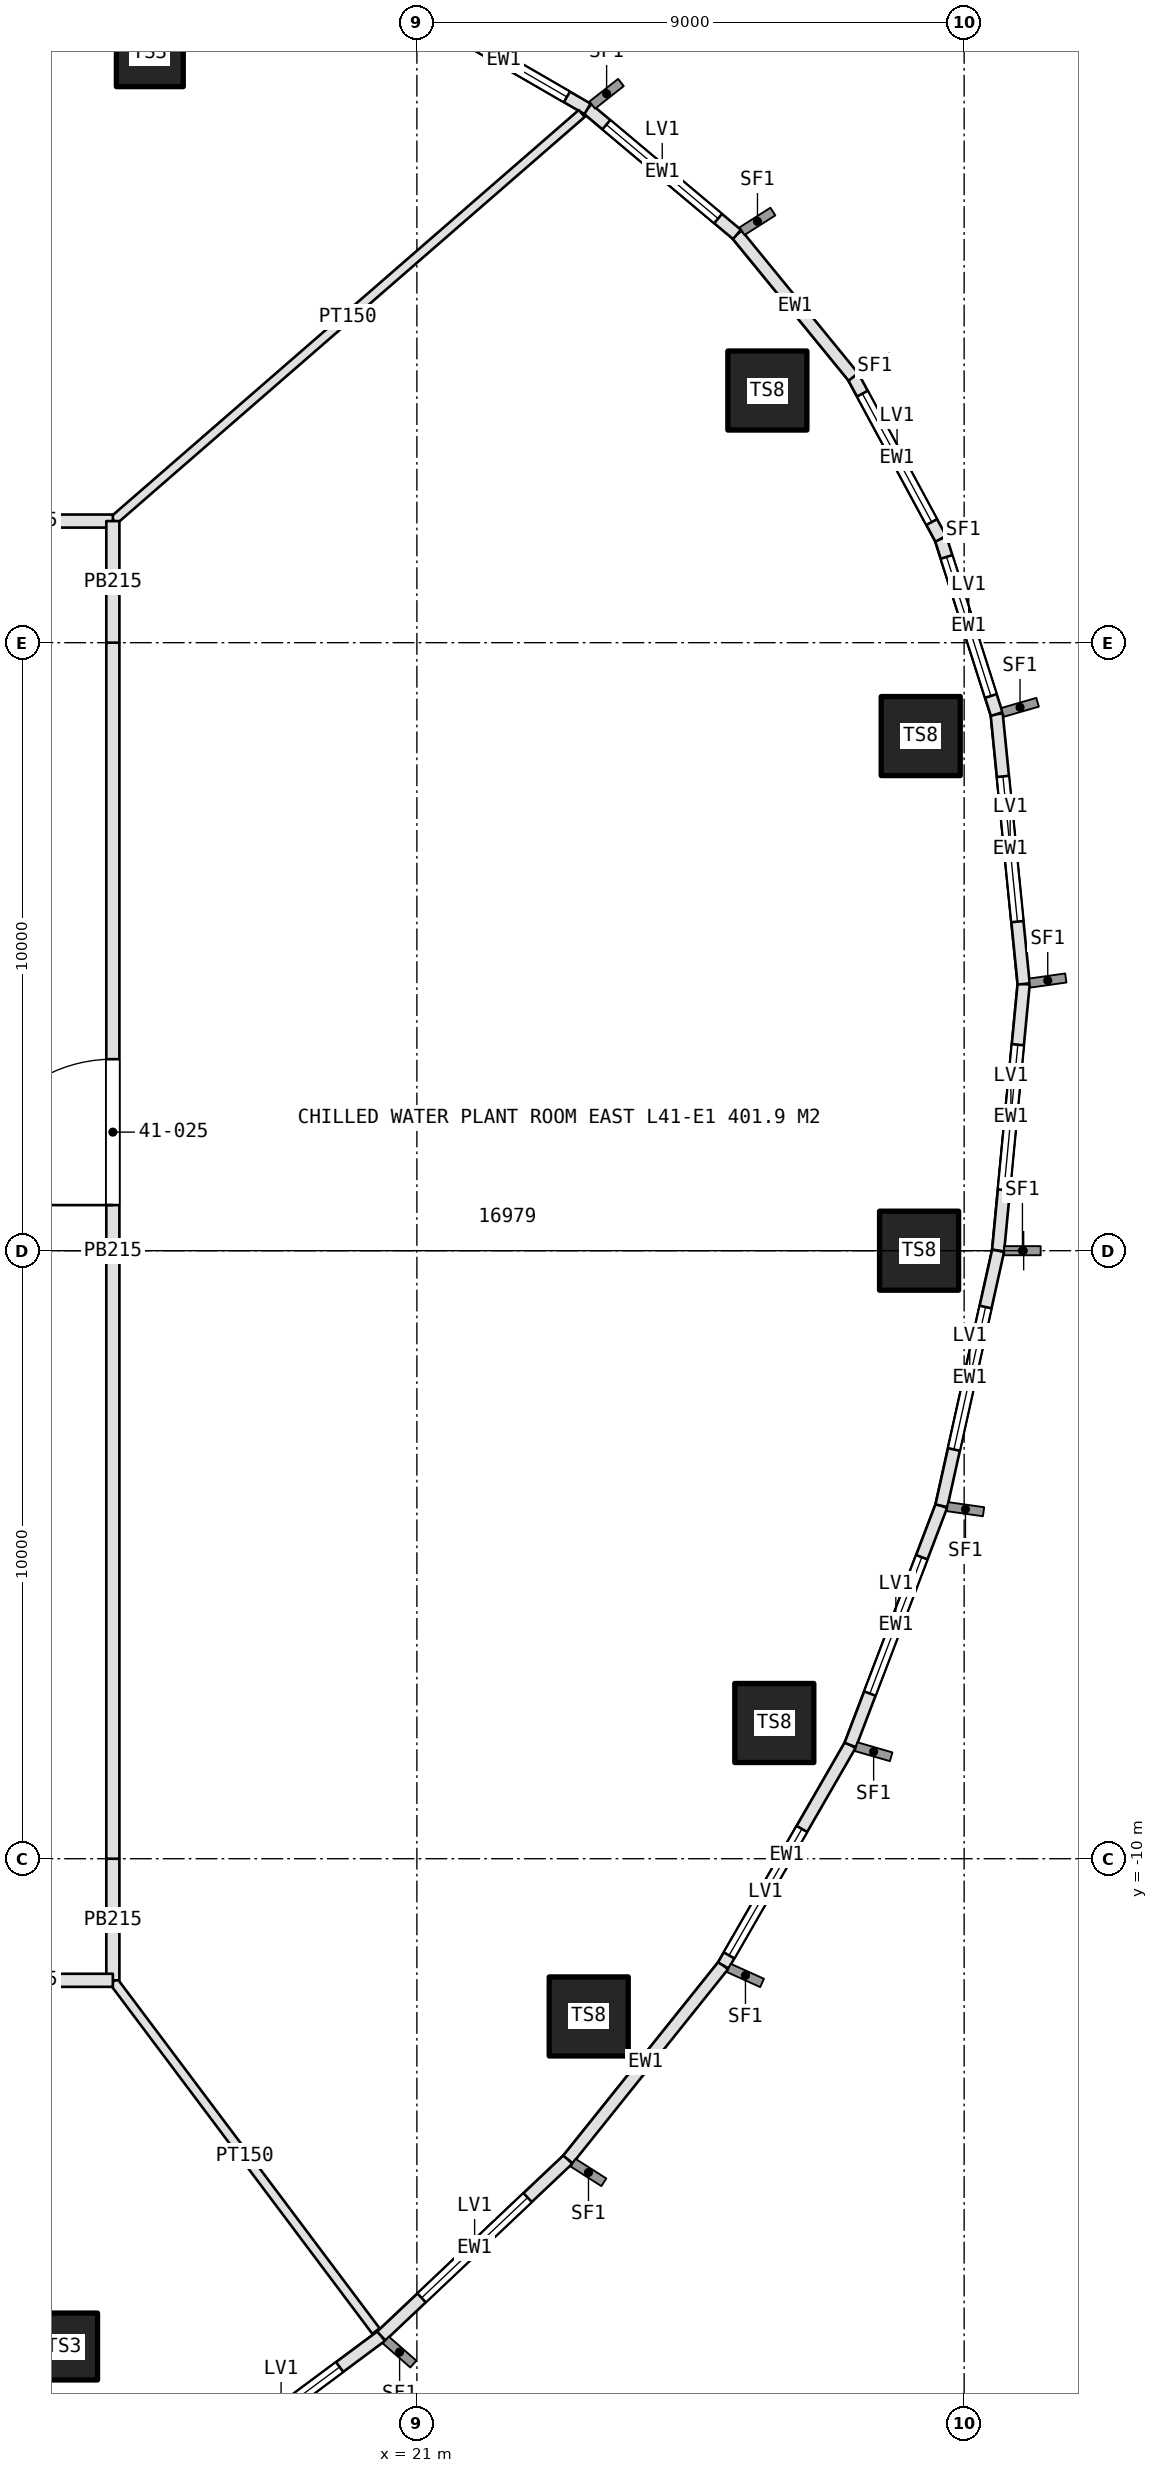
"""IFC4 building model, lengths in metres.
Left out: names, types, materials, properties, quantities, classifications, styles, units other than length and angle.
Written with IfcOpenShell. Run it as: python <this file> out.ifc"""

import sys

from ifc_helpers import new_model, si_unit, direction, frame, frame_2d, origin, origin_2d, place, context, subcontext, project, spatial, rectangle, hollow_rectangle, extrude, element, fill, save


model = new_model("IFC4")
c1 = context("Model", 3, precision=1e-05, world=origin(), true_north=direction((0.0, 1.0)))
c2 = subcontext(c1, "Body", "Model", "MODEL_VIEW")
j1 = project(units=[si_unit("LENGTHUNIT", "METRE"), si_unit("PLANEANGLEUNIT", "RADIAN")], contexts=[c1])
p1 = place(None, origin())
s1 = spatial("IfcSite", under=j1, at=p1, CompositionType="ELEMENT")
p2 = place(p1, origin())
s2 = spatial("IfcBuilding", under=s1, at=p2, CompositionType="ELEMENT")
p3 = place(p2, frame((0.0, 0.0, 189.8)))
s3 = spatial("IfcBuildingStorey", under=s2, at=p3, CompositionType="ELEMENT", Elevation=189.8)
p4 = place(p3, frame((29.259, 0.0, 0.775), z_axis=(-0.767771389369, 0.0, 0.640723882547), x_axis=(0.0, -1.0, 0.0)))
e1 = element("IfcColumn", 1, at=p4, inside=s3, PredefinedType="COLUMN", context=c2, shape_type="SweptSolid", body=[
    extrude(hollow_rectangle(XDim=1.3, YDim=1.3, WallThickness=0.15, at=origin_2d()), origin(), (0.0, 0.0, 1.0), 5.385),
])
p5 = place(p3, frame((29.286, 8.464, 0.775), z_axis=(-0.732679942775, -0.211697678224, 0.64681078724), x_axis=(0.277581506232, -0.960702090868, 0.0)))
e2 = element("IfcColumn", 2, at=p5, inside=s3, PredefinedType="COLUMN", context=c2, shape_type="SweptSolid", body=[
    extrude(hollow_rectangle(XDim=1.3, YDim=1.3, WallThickness=0.15, at=origin_2d()), origin(), (0.0, 0.0, 1.0), 5.334),
])
p6 = place(p3, frame((26.764, 14.147, 0.775), z_axis=(-0.610454698287, -0.322859749878, 0.723261116919), x_axis=(0.467523310698, -0.883980742977, 0.0)))
e3 = element("IfcColumn", 3, at=p6, inside=s3, PredefinedType="COLUMN", context=c2, shape_type="SweptSolid", body=[
    extrude(hollow_rectangle(XDim=1.3, YDim=1.3, WallThickness=0.15, at=origin_2d()), origin(), (0.0, 0.0, 1.0), 4.77),
])
for number, where, z_axis, x_axis in (
    (4, (16.608, 19.695, 0.0), (0.0, 0.0, 1.0), (1.0, 0.0, 0.0)),
    (5, (15.198, -18.023, 0.0), (0.0, 0.0, 1.0), (1.0, 0.0, 0.0)),
):
    element("IfcColumn", number, at=place(p3, frame(where, z_axis=z_axis, x_axis=x_axis)), inside=s3, PredefinedType="COLUMN", context=c2, shape_type="SweptSolid", body=[
        extrude(hollow_rectangle(XDim=1.1, YDim=1.1, WallThickness=0.08, at=origin_2d()), origin(), (0.0, 0.0, 1.0), 5.0),
    ])
p7 = place(p3, frame((23.826, -12.594, 0.775), z_axis=(-0.603464431444, 0.319030943318, 0.730787203765), x_axis=(-0.46737246298, -0.884060507459, 0.0)))
e6 = element("IfcColumn", 6, at=p7, inside=s3, PredefinedType="COLUMN", context=c2, shape_type="SweptSolid", body=[
    extrude(hollow_rectangle(XDim=1.3, YDim=1.3, WallThickness=0.15, at=origin_2d()), origin(), (0.0, 0.0, 1.0), 4.721),
])
p8 = place(p3, frame((26.878, -7.768, 0.775), z_axis=(-0.766908744303, 0.22155236219, 0.602300198174), x_axis=(-0.277540747952, -0.960713866469, 0.0)))
e7 = element("IfcColumn", 7, at=p8, inside=s3, PredefinedType="COLUMN", context=c2, shape_type="SweptSolid", body=[
    extrude(hollow_rectangle(XDim=1.3, YDim=1.3, WallThickness=0.15, at=origin_2d()), origin(), (0.0, 0.0, 1.0), 5.728),
])
p9 = place(p3, frame((30.559, 0.0, 0.0), z_axis=(0.0, 0.0, 1.0), x_axis=(0.095339778548, 0.995444788337, 0.0)))
e8 = element("IfcWall", 8, at=p9, inside=s3, PredefinedType="SOLIDWALL", context=c2, shape_type="SweptSolid", body=[
    extrude(rectangle(XDim=4.407, YDim=0.2, at=frame_2d((2.204, 0.0))), origin(), (0.0, 0.0, 1.0), 5.0),
])
p10 = place(p9, frame((1.003, 0.0, 1.6)))
e9 = element("IfcOpeningElement", 9, at=p10, cuts=e8, PredefinedType="OPENING", context=c2, shape_type="SweptSolid", body=[
    extrude(rectangle(XDim=2.4, YDim=1.8, at=frame_2d((1.2, 0.9))), frame((0.0, 0.11, 0.0), z_axis=(0.0, -1.0, 0.0), x_axis=(1.0, 0.0, 0.0)), (0.0, 0.0, 1.0), 0.22),
])
p11 = place(p3, frame((30.979, 4.387, 0.0), z_axis=(0.0, 0.0, 1.0), x_axis=(-0.099509138376, 0.99503664826, 0.0)))
e10 = element("IfcWall", 10, at=p11, inside=s3, PredefinedType="SOLIDWALL", context=c2, shape_type="SweptSolid", body=[
    extrude(rectangle(XDim=4.46, YDim=0.2, at=frame_2d((2.23, 0.0))), origin(), (0.0, 0.0, 1.0), 5.0),
])
p12 = place(p11, frame((1.03, 0.0, 1.6)))
e11 = element("IfcOpeningElement", 11, at=p12, cuts=e10, PredefinedType="OPENING", context=c2, shape_type="SweptSolid", body=[
    extrude(rectangle(XDim=2.4, YDim=1.8, at=frame_2d((1.2, 0.9))), frame((0.0, 0.11, 0.0), z_axis=(0.0, -1.0, 0.0), x_axis=(1.0, 0.0, 0.0)), (0.0, 0.0, 1.0), 0.22),
])
p13 = place(p3, frame((30.535, 8.825, 0.0), z_axis=(0.0, 0.0, 1.0), x_axis=(-0.303736389134, 0.952756110406, 0.0)))
e12 = element("IfcWall", 12, at=p13, inside=s3, PredefinedType="SOLIDWALL", context=c2, shape_type="SweptSolid", body=[
    extrude(rectangle(XDim=3.026, YDim=0.2, at=frame_2d((1.513, 0.0))), origin(), (0.0, 0.0, 1.0), 5.0),
])
p14 = place(p13, frame((0.313, 0.0, 1.6)))
e13 = element("IfcOpeningElement", 13, at=p14, cuts=e12, PredefinedType="OPENING", context=c2, shape_type="SweptSolid", body=[
    extrude(rectangle(XDim=2.4, YDim=1.8, at=frame_2d((1.2, 0.9))), frame((0.0, 0.11, 0.0), z_axis=(0.0, -1.0, 0.0), x_axis=(1.0, 0.0, 0.0)), (0.0, 0.0, 1.0), 0.22),
])
p15 = place(p3, frame((29.616, 11.708, 0.0), z_axis=(0.0, 0.0, 1.0), x_axis=(-0.475196386684, 0.879879761151, 0.0)))
e14 = element("IfcWall", 14, at=p15, inside=s3, PredefinedType="SOLIDWALL", context=c2, shape_type="SweptSolid", body=[
    extrude(rectangle(XDim=3.026, YDim=0.2, at=frame_2d((1.513, 0.0))), origin(), (0.0, 0.0, 1.0), 5.0),
])
p16 = place(p15, frame((0.313, 0.0, 1.6)))
e15 = element("IfcOpeningElement", 15, at=p16, cuts=e14, PredefinedType="OPENING", context=c2, shape_type="SweptSolid", body=[
    extrude(rectangle(XDim=2.4, YDim=1.8, at=frame_2d((1.2, 0.9))), frame((0.0, 0.11, 0.0), z_axis=(0.0, -1.0, 0.0), x_axis=(1.0, 0.0, 0.0)), (0.0, 0.0, 1.0), 0.22),
])
p17 = place(p3, frame((28.178, 14.371, 0.0), z_axis=(0.0, 0.0, 1.0), x_axis=(-0.632574099332, 0.774499844322, 0.0)))
e16 = element("IfcWall", 16, at=p17, inside=s3, PredefinedType="SOLIDWALL", context=c2, shape_type="SweptSolid", body=[
    extrude(rectangle(XDim=3.026, YDim=0.2, at=frame_2d((1.513, 0.0))), origin(), (0.0, 0.0, 1.0), 5.0),
])
p18 = place(p3, frame((26.264, 16.715, 0.0), z_axis=(0.0, 0.0, 1.0), x_axis=(-0.76560297856, 0.643313360051, 0.0)))
e17 = element("IfcWall", 17, at=p18, inside=s3, PredefinedType="SOLIDWALL", context=c2, shape_type="SweptSolid", body=[
    extrude(rectangle(XDim=3.21, YDim=0.2, at=frame_2d((1.605, 0.0))), origin(), (0.0, 0.0, 1.0), 5.0),
])
p19 = place(p18, frame((0.405, 0.0, 1.6)))
e18 = element("IfcOpeningElement", 18, at=p19, cuts=e17, PredefinedType="OPENING", context=c2, shape_type="SweptSolid", body=[
    extrude(rectangle(XDim=2.4, YDim=1.8, at=frame_2d((1.2, 0.9))), frame((0.0, 0.11, 0.0), z_axis=(0.0, -1.0, 0.0), x_axis=(1.0, 0.0, 0.0)), (0.0, 0.0, 1.0), 0.22),
])
p20 = place(p3, frame((23.806, 18.78, 0.0), z_axis=(0.0, 0.0, 1.0), x_axis=(-0.865315990088, 0.501226732426, 0.0)))
e19 = element("IfcWall", 19, at=p20, inside=s3, PredefinedType="SOLIDWALL", context=c2, shape_type="SweptSolid", body=[
    extrude(rectangle(XDim=3.183, YDim=0.2, at=frame_2d((1.592, 0.0))), origin(), (0.0, 0.0, 1.0), 5.0),
])
p21 = place(p20, frame((0.392, 0.0, 1.6)))
e20 = element("IfcOpeningElement", 20, at=p21, cuts=e19, PredefinedType="OPENING", context=c2, shape_type="SweptSolid", body=[
    extrude(rectangle(XDim=2.4, YDim=1.8, at=frame_2d((1.2, 0.9))), frame((0.0, 0.11, 0.0), z_axis=(0.0, -1.0, 0.0), x_axis=(1.0, 0.0, 0.0)), (0.0, 0.0, 1.0), 0.22),
])
p22 = place(p3, frame((17.119, -20.301, 0.0), z_axis=(0.0, 0.0, 1.0), x_axis=(0.802511242032, 0.596636997187, 0.0)))
e21 = element("IfcWall", 21, at=p22, inside=s3, PredefinedType="SOLIDWALL", context=c2, shape_type="SweptSolid", body=[
    extrude(rectangle(XDim=4.107, YDim=0.2, at=frame_2d((2.053, 0.0))), origin(), (0.0, 0.0, 1.0), 5.0),
])
p23 = place(p22, frame((0.853, 0.0, 1.6)))
e22 = element("IfcOpeningElement", 22, at=p23, cuts=e21, PredefinedType="OPENING", context=c2, shape_type="SweptSolid", body=[
    extrude(rectangle(XDim=2.4, YDim=1.8, at=frame_2d((1.2, 0.9))), frame((0.0, 0.11, 0.0), z_axis=(0.0, -1.0, 0.0), x_axis=(1.0, 0.0, 0.0)), (0.0, 0.0, 1.0), 0.22),
])
p24 = place(p3, frame((20.415, -17.851, 0.0), z_axis=(0.0, 0.0, 1.0), x_axis=(0.726389692906, 0.687283066894, 0.0)))
e23 = element("IfcWall", 23, at=p24, inside=s3, PredefinedType="SOLIDWALL", context=c2, shape_type="SweptSolid", body=[
    extrude(rectangle(XDim=4.227, YDim=0.2, at=frame_2d((2.113, 0.0))), origin(), (0.0, 0.0, 1.0), 5.0),
])
p25 = place(p24, frame((0.913, 0.0, 1.6)))
e24 = element("IfcOpeningElement", 24, at=p25, cuts=e23, PredefinedType="OPENING", context=c2, shape_type="SweptSolid", body=[
    extrude(rectangle(XDim=2.4, YDim=1.8, at=frame_2d((1.2, 0.9))), frame((0.0, 0.11, 0.0), z_axis=(0.0, -1.0, 0.0), x_axis=(1.0, 0.0, 0.0)), (0.0, 0.0, 1.0), 0.22),
])
p26 = place(p3, frame((23.485, -14.946, 0.0), z_axis=(0.0, 0.0, 1.0), x_axis=(0.625008242273, 0.780618150628, 0.0)))
e25 = element("IfcWall", 25, at=p26, inside=s3, PredefinedType="SOLIDWALL", context=c2, shape_type="SweptSolid", body=[
    extrude(rectangle(XDim=4.087, YDim=0.2, at=frame_2d((2.043, 0.0))), origin(), (0.0, 0.0, 1.0), 5.0),
])
p27 = place(p3, frame((26.039, -11.755, 0.0), z_axis=(0.0, 0.0, 1.0), x_axis=(0.499089259287, 0.866550582058, 0.0)))
e26 = element("IfcWall", 26, at=p27, inside=s3, PredefinedType="SOLIDWALL", context=c2, shape_type="SweptSolid", body=[
    extrude(rectangle(XDim=4.184, YDim=0.2, at=frame_2d((2.092, 0.0))), origin(), (0.0, 0.0, 1.0), 5.0),
])
p28 = place(p27, frame((0.191, 0.0, 1.6)))
e27 = element("IfcOpeningElement", 27, at=p28, cuts=e26, PredefinedType="OPENING", context=c2, shape_type="SweptSolid", body=[
    extrude(rectangle(XDim=2.4, YDim=1.8, at=frame_2d((1.2, 0.9))), frame((0.0, 0.11, 0.0), z_axis=(0.0, -1.0, 0.0), x_axis=(1.0, 0.0, 0.0)), (0.0, 0.0, 1.0), 0.22),
])
p29 = place(p3, frame((28.127, -8.129, 0.0), z_axis=(0.0, 0.0, 1.0), x_axis=(0.356012208341, 0.934481303993, 0.0)))
e28 = element("IfcWall", 28, at=p29, inside=s3, PredefinedType="SOLIDWALL", context=c2, shape_type="SweptSolid", body=[
    extrude(rectangle(XDim=4.21, YDim=0.2, at=frame_2d((2.105, 0.0))), origin(), (0.0, 0.0, 1.0), 5.0),
])
p30 = place(p29, frame((0.905, 0.0, 1.6)))
e29 = element("IfcOpeningElement", 29, at=p30, cuts=e28, PredefinedType="OPENING", context=c2, shape_type="SweptSolid", body=[
    extrude(rectangle(XDim=2.4, YDim=1.8, at=frame_2d((1.2, 0.9))), frame((0.0, 0.11, 0.0), z_axis=(0.0, -1.0, 0.0), x_axis=(1.0, 0.0, 0.0)), (0.0, 0.0, 1.0), 0.22),
])
p31 = place(p3, frame((29.626, -4.195, 0.0), z_axis=(0.0, 0.0, 1.0), x_axis=(0.217002635497, 0.9761710179, 0.0)))
e30 = element("IfcWall", 30, at=p31, inside=s3, PredefinedType="SOLIDWALL", context=c2, shape_type="SweptSolid", body=[
    extrude(rectangle(XDim=4.298, YDim=0.2, at=frame_2d((2.149, 0.0))), origin(), (0.0, 0.0, 1.0), 5.0),
])
p32 = place(p31, frame((0.949, 0.0, 1.6)))
e31 = element("IfcOpeningElement", 31, at=p32, cuts=e30, PredefinedType="OPENING", context=c2, shape_type="SweptSolid", body=[
    extrude(rectangle(XDim=2.4, YDim=1.8, at=frame_2d((1.2, 0.9))), frame((0.0, 0.11, 0.0), z_axis=(0.0, -1.0, 0.0), x_axis=(1.0, 0.0, 0.0)), (0.0, 0.0, 1.0), 0.22),
])
p33 = place(p3, frame((16.012, -12.016, 0.0), z_axis=(0.0, 0.0, 1.0), x_axis=(0.600059749679, -0.799955184254, 0.0)))
e32 = element("IfcWall", 32, at=p33, inside=s3, PredefinedType="PARTITIONING", context=c2, shape_type="SweptSolid", body=[
    extrude(rectangle(XDim=7.191, YDim=0.15, at=frame_2d((3.596, 0.0))), origin(), (0.0, 0.0, 1.0), 4.2),
])
p34 = place(p3, frame((16.015, 12.013, 0.0), z_axis=(0.0, 0.0, 1.0), x_axis=(0.754689007548, 0.656082694397, 0.0)))
e33 = element("IfcWall", 33, at=p34, inside=s3, PredefinedType="PARTITIONING", context=c2, shape_type="SweptSolid", body=[
    extrude(rectangle(XDim=10.198, YDim=0.15, at=frame_2d((5.099, 0.0))), origin(), (0.0, 0.0, 1.0), 4.2),
])
for number, where, z_axis, x_axis in (
    (34, (16.0, 12.0, 0.0), (0.0, 0.0, 1.0), (-1.0, 0.0, 0.0)),
    (35, (16.0, -12.0, 0.0), (0.0, 0.0, 1.0), (0.0, 1.0, 0.0)),
):
    element("IfcWall", number, at=place(p3, frame(where, z_axis=z_axis, x_axis=x_axis)), inside=s3, PredefinedType="PARTITIONING", context=c2, shape_type="SweptSolid", body=[
        extrude(rectangle(XDim=2.0, YDim=0.215, at=frame_2d((1.0, 0.0))), origin(), (0.0, 0.0, 1.0), 4.2),
    ])
p35 = place(p3, frame((16.0, -10.0, 0.0), z_axis=(0.0, 0.0, 1.0), x_axis=(0.0, 1.0, 0.0)))
e36 = element("IfcWall", 36, at=p35, inside=s3, PredefinedType="PARTITIONING", context=c2, shape_type="SweptSolid", body=[
    extrude(rectangle(XDim=20.0, YDim=0.215, at=frame_2d((10.0, 0.0))), origin(), (0.0, 0.0, 1.0), 4.2),
])
p36 = place(p35, frame((10.75, 0.0, 0.0)))
e37 = element("IfcOpeningElement", 37, at=p36, cuts=e36, PredefinedType="OPENING", context=c2, shape_type="SweptSolid", body=[
    extrude(rectangle(XDim=2.4, YDim=2.4, at=frame_2d((1.2, 1.2))), frame((0.0, 0.118, 0.0), z_axis=(0.0, -1.0, 0.0), x_axis=(1.0, 0.0, 0.0)), (0.0, 0.0, 1.0), 0.235),
])
for number, where, z_axis, x_axis in (
    (38, (16.0, 10.0, 0.0), (0.0, 0.0, 1.0), (0.0, 1.0, 0.0)),
    (39, (14.0, -12.0, 0.0), (0.0, 0.0, 1.0), (1.0, 0.0, 0.0)),
):
    element("IfcWall", number, at=place(p3, frame(where, z_axis=z_axis, x_axis=x_axis)), inside=s3, PredefinedType="PARTITIONING", context=c2, shape_type="SweptSolid", body=[
        extrude(rectangle(XDim=2.0, YDim=0.215, at=frame_2d((1.0, 0.0))), origin(), (0.0, 0.0, 1.0), 4.2),
    ])
p37 = place(p10, origin())
e40 = element("IfcWindow", 40, at=p37, inside=s3, PartitioningType="SINGLE_PANEL", PredefinedType="WINDOW", context=c2, shape_type="SweptSolid", body=[
    extrude(rectangle(XDim=2.4, YDim=1.8, at=frame_2d((1.2, 0.9))), frame((0.0, 0.03, 0.0), z_axis=(0.0, -1.0, 0.0), x_axis=(1.0, 0.0, 0.0)), (0.0, 0.0, 1.0), 0.06),
])
fill(e9, e40)
p38 = place(p12, origin())
e41 = element("IfcWindow", 41, at=p38, inside=s3, PartitioningType="SINGLE_PANEL", PredefinedType="WINDOW", context=c2, shape_type="SweptSolid", body=[
    extrude(rectangle(XDim=2.4, YDim=1.8, at=frame_2d((1.2, 0.9))), frame((0.0, 0.03, 0.0), z_axis=(0.0, -1.0, 0.0), x_axis=(1.0, 0.0, 0.0)), (0.0, 0.0, 1.0), 0.06),
])
fill(e11, e41)
p39 = place(p14, origin())
e42 = element("IfcWindow", 42, at=p39, inside=s3, PartitioningType="SINGLE_PANEL", PredefinedType="WINDOW", context=c2, shape_type="SweptSolid", body=[
    extrude(rectangle(XDim=2.4, YDim=1.8, at=frame_2d((1.2, 0.9))), frame((0.0, 0.03, 0.0), z_axis=(0.0, -1.0, 0.0), x_axis=(1.0, 0.0, 0.0)), (0.0, 0.0, 1.0), 0.06),
])
fill(e13, e42)
p40 = place(p16, origin())
e43 = element("IfcWindow", 43, at=p40, inside=s3, PartitioningType="SINGLE_PANEL", PredefinedType="WINDOW", context=c2, shape_type="SweptSolid", body=[
    extrude(rectangle(XDim=2.4, YDim=1.8, at=frame_2d((1.2, 0.9))), frame((0.0, 0.03, 0.0), z_axis=(0.0, -1.0, 0.0), x_axis=(1.0, 0.0, 0.0)), (0.0, 0.0, 1.0), 0.06),
])
fill(e15, e43)
p41 = place(p19, origin())
e44 = element("IfcWindow", 44, at=p41, inside=s3, PartitioningType="SINGLE_PANEL", PredefinedType="WINDOW", context=c2, shape_type="SweptSolid", body=[
    extrude(rectangle(XDim=2.4, YDim=1.8, at=frame_2d((1.2, 0.9))), frame((0.0, 0.03, 0.0), z_axis=(0.0, -1.0, 0.0), x_axis=(1.0, 0.0, 0.0)), (0.0, 0.0, 1.0), 0.06),
])
fill(e18, e44)
p42 = place(p21, origin())
e45 = element("IfcWindow", 45, at=p42, inside=s3, PartitioningType="SINGLE_PANEL", PredefinedType="WINDOW", context=c2, shape_type="SweptSolid", body=[
    extrude(rectangle(XDim=2.4, YDim=1.8, at=frame_2d((1.2, 0.9))), frame((0.0, 0.03, 0.0), z_axis=(0.0, -1.0, 0.0), x_axis=(1.0, 0.0, 0.0)), (0.0, 0.0, 1.0), 0.06),
])
fill(e20, e45)
p43 = place(p23, origin())
e46 = element("IfcWindow", 46, at=p43, inside=s3, PartitioningType="SINGLE_PANEL", PredefinedType="WINDOW", context=c2, shape_type="SweptSolid", body=[
    extrude(rectangle(XDim=2.4, YDim=1.8, at=frame_2d((1.2, 0.9))), frame((0.0, 0.03, 0.0), z_axis=(0.0, -1.0, 0.0), x_axis=(1.0, 0.0, 0.0)), (0.0, 0.0, 1.0), 0.06),
])
fill(e22, e46)
p44 = place(p25, origin())
e47 = element("IfcWindow", 47, at=p44, inside=s3, PartitioningType="SINGLE_PANEL", PredefinedType="WINDOW", context=c2, shape_type="SweptSolid", body=[
    extrude(rectangle(XDim=2.4, YDim=1.8, at=frame_2d((1.2, 0.9))), frame((0.0, 0.03, 0.0), z_axis=(0.0, -1.0, 0.0), x_axis=(1.0, 0.0, 0.0)), (0.0, 0.0, 1.0), 0.06),
])
fill(e24, e47)
p45 = place(p28, origin())
e48 = element("IfcWindow", 48, at=p45, inside=s3, PartitioningType="SINGLE_PANEL", PredefinedType="WINDOW", context=c2, shape_type="SweptSolid", body=[
    extrude(rectangle(XDim=2.4, YDim=1.8, at=frame_2d((1.2, 0.9))), frame((0.0, 0.03, 0.0), z_axis=(0.0, -1.0, 0.0), x_axis=(1.0, 0.0, 0.0)), (0.0, 0.0, 1.0), 0.06),
])
fill(e27, e48)
p46 = place(p30, origin())
e49 = element("IfcWindow", 49, at=p46, inside=s3, PartitioningType="SINGLE_PANEL", PredefinedType="WINDOW", context=c2, shape_type="SweptSolid", body=[
    extrude(rectangle(XDim=2.4, YDim=1.8, at=frame_2d((1.2, 0.9))), frame((0.0, 0.03, 0.0), z_axis=(0.0, -1.0, 0.0), x_axis=(1.0, 0.0, 0.0)), (0.0, 0.0, 1.0), 0.06),
])
fill(e29, e49)
p47 = place(p32, origin())
e50 = element("IfcWindow", 50, at=p47, inside=s3, PartitioningType="SINGLE_PANEL", PredefinedType="WINDOW", context=c2, shape_type="SweptSolid", body=[
    extrude(rectangle(XDim=2.4, YDim=1.8, at=frame_2d((1.2, 0.9))), frame((0.0, 0.03, 0.0), z_axis=(0.0, -1.0, 0.0), x_axis=(1.0, 0.0, 0.0)), (0.0, 0.0, 1.0), 0.06),
])
fill(e31, e50)
p48 = place(p36, origin())
e51 = element("IfcDoor", 51, at=p48, inside=s3, OperationType="DOUBLE_DOOR_SINGLE_SWING", PredefinedType="DOOR", context=c2, shape_type="SweptSolid", body=[
    extrude(rectangle(XDim=2.4, YDim=2.4, at=frame_2d((1.2, 1.2))), frame((0.0, 0.025, 0.0), z_axis=(0.0, -1.0, 0.0), x_axis=(1.0, 0.0, 0.0)), (0.0, 0.0, 1.0), 0.05),
])
fill(e37, e51)
save(model, sys.argv[1])
